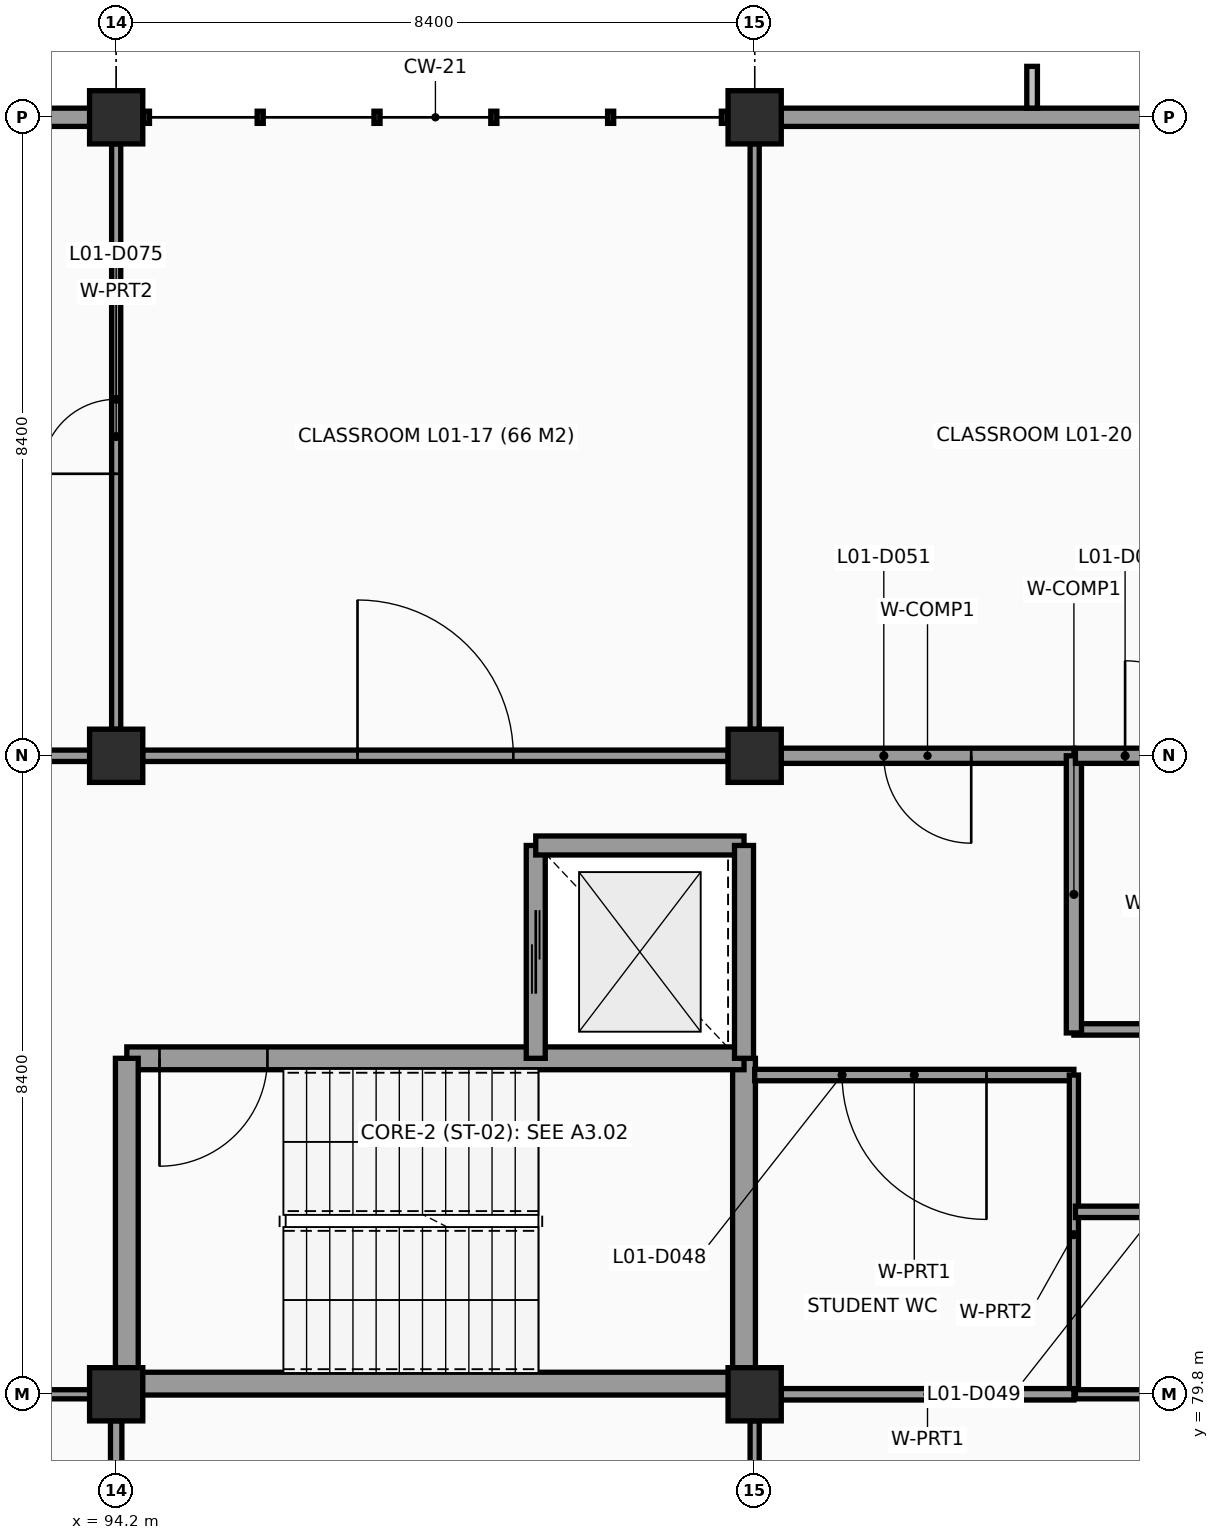
"""IFC4 building model, lengths in metres.
Left out: names, types, materials, properties, quantities, classifications, styles, units other than length and angle.
Written with IfcOpenShell. Run it as: python <this file> out.ifc"""

import sys

from ifc_helpers import new_model, si_unit, direction, frame, frame_2d, origin, origin_2d, place, context, subcontext, project, spatial, rectangle, extrude, element, fill, save


model = new_model("IFC4")
c1 = context("Model", 3, precision=1e-05, world=origin(), true_north=direction((0.0, 1.0)))
c2 = subcontext(c1, "Body", "Model", "MODEL_VIEW")
j1 = project(units=[si_unit("LENGTHUNIT", "METRE"), si_unit("PLANEANGLEUNIT", "RADIAN")], contexts=[c1])
p1 = place(None, origin())
s1 = spatial("IfcSite", under=j1, at=p1, CompositionType="ELEMENT")
p2 = place(p1, origin())
s2 = spatial("IfcBuilding", under=s1, at=p2, CompositionType="ELEMENT")
p3 = place(p2, frame((0.0, 0.0, 4.2)))
s3 = spatial("IfcBuildingStorey", under=s2, at=p3, CompositionType="ELEMENT", Elevation=4.2)
for number, where, z_axis, x_axis in (
    (1, (94.2, 79.8, 0.0), (0.0, 0.0, 1.0), (1.0, 0.0, 0.0)),
    (2, (94.2, 88.2, 0.0), (0.0, 0.0, 1.0), (1.0, 0.0, 0.0)),
    (3, (94.2, 96.6, 0.0), (0.0, 0.0, 1.0), (1.0, 0.0, 0.0)),
    (4, (102.6, 79.8, 0.0), (0.0, 0.0, 1.0), (1.0, 0.0, 0.0)),
    (5, (102.6, 88.2, 0.0), (0.0, 0.0, 1.0), (1.0, 0.0, 0.0)),
    (6, (102.6, 96.6, 0.0), (0.0, 0.0, 1.0), (1.0, 0.0, 0.0)),
):
    element("IfcColumn", number, at=place(p3, frame(where, z_axis=z_axis, x_axis=x_axis)), inside=s3, PredefinedType="COLUMN", context=c2, shape_type="SweptSolid", body=[
        extrude(rectangle(XDim=0.7, YDim=0.7, at=origin_2d()), origin(), (0.0, 0.0, 1.0), 3.6),
    ])
p4 = place(p3, frame((86.148, 96.6, 0.0), z_axis=(0.0, 0.0, 1.0), x_axis=(1.0, 0.0, 0.0)))
e7 = element("IfcWall", 7, at=p4, inside=s3, PredefinedType="SOLIDWALL", context=c2, shape_type="SweptSolid", body=[
    extrude(rectangle(XDim=7.704, YDim=0.24, at=frame_2d((3.852, 0.0))), origin(), (0.0, 0.0, 1.0), 2.57),
])
p5 = place(p3, frame((102.948, 96.6, 0.0), z_axis=(0.0, 0.0, 1.0), x_axis=(1.0, 0.0, 0.0)))
e8 = element("IfcWall", 8, at=p5, inside=s3, PredefinedType="SOLIDWALL", context=c2, shape_type="SweptSolid", body=[
    extrude(rectangle(XDim=6.604, YDim=0.24, at=frame_2d((3.302, 0.0))), origin(), (0.0, 0.0, 1.0), 2.57),
])
p6 = place(p3, frame((94.34, 79.94, 0.0), z_axis=(0.0, 0.0, 1.0), x_axis=(1.0, 0.0, 0.0)))
e9 = element("IfcWall", 9, at=p6, inside=s3, PredefinedType="SHEAR", context=c2, shape_type="SweptSolid", body=[
    extrude(rectangle(XDim=8.12, YDim=0.3, at=frame_2d((4.06, 0.0))), origin(), (0.0, 0.0, 1.0), 3.6),
])
p7 = place(p3, frame((102.46, 79.94, 0.0), z_axis=(0.0, 0.0, 1.0), x_axis=(0.0, 1.0, 0.0)))
e10 = element("IfcWall", 10, at=p7, inside=s3, PredefinedType="SHEAR", context=c2, shape_type="SweptSolid", body=[
    extrude(rectangle(XDim=4.28, YDim=0.3, at=frame_2d((2.14, 0.0))), origin(), (0.0, 0.0, 1.0), 3.6),
])
p8 = place(p3, frame((102.46, 84.22, 0.0), z_axis=(0.0, 0.0, 1.0), x_axis=(-1.0, 0.0, 0.0)))
e11 = element("IfcWall", 11, at=p8, inside=s3, PredefinedType="SHEAR", context=c2, shape_type="SweptSolid", body=[
    extrude(rectangle(XDim=8.12, YDim=0.3, at=frame_2d((4.06, 0.0))), origin(), (0.0, 0.0, 1.0), 3.6),
])
p9 = place(p8, frame((6.27, 0.0, 0.0)))
e12 = element("IfcOpeningElement", 12, at=p9, cuts=e11, PredefinedType="OPENING", context=c2, shape_type="SweptSolid", body=[
    extrude(rectangle(XDim=1.42, YDim=2.15, at=frame_2d((0.71, 1.075))), frame((0.0, 0.16, 0.0), z_axis=(0.0, -1.0, 0.0), x_axis=(1.0, 0.0, 0.0)), (0.0, 0.0, 1.0), 0.32),
])
p10 = place(p3, frame((94.34, 84.22, 0.0), z_axis=(0.0, 0.0, 1.0), x_axis=(0.0, -1.0, 0.0)))
e13 = element("IfcWall", 13, at=p10, inside=s3, PredefinedType="SHEAR", context=c2, shape_type="SweptSolid", body=[
    extrude(rectangle(XDim=4.28, YDim=0.3, at=frame_2d((2.14, 0.0))), origin(), (0.0, 0.0, 1.0), 3.6),
])
p11 = place(p3, frame((99.72, 87.02, 0.0), z_axis=(0.0, 0.0, 1.0), x_axis=(0.0, -1.0, 0.0)))
e14 = element("IfcWall", 14, at=p11, inside=s3, PredefinedType="SHEAR", context=c2, shape_type="SweptSolid", body=[
    extrude(rectangle(XDim=2.8, YDim=0.25, at=frame_2d((1.4, 0.0))), origin(), (0.0, 0.0, 1.0), 3.6),
])
p12 = place(p11, frame((0.85, 0.0, 0.0)))
e15 = element("IfcOpeningElement", 15, at=p12, cuts=e14, PredefinedType="OPENING", context=c2, shape_type="SweptSolid", body=[
    extrude(rectangle(XDim=1.1, YDim=2.15, at=frame_2d((0.55, 1.075))), frame((0.0, 0.135, 0.0), z_axis=(0.0, -1.0, 0.0), x_axis=(1.0, 0.0, 0.0)), (0.0, 0.0, 1.0), 0.27),
])
p13 = place(p3, frame((102.46, 87.02, 0.0), z_axis=(0.0, 0.0, 1.0), x_axis=(-1.0, 0.0, 0.0)))
e16 = element("IfcWall", 16, at=p13, inside=s3, PredefinedType="SHEAR", context=c2, shape_type="SweptSolid", body=[
    extrude(rectangle(XDim=2.74, YDim=0.25, at=frame_2d((1.37, 0.0))), origin(), (0.0, 0.0, 1.0), 3.6),
])
p14 = place(p3, frame((102.46, 84.22, 0.0), z_axis=(0.0, 0.0, 1.0), x_axis=(0.0, 1.0, 0.0)))
e17 = element("IfcWall", 17, at=p14, inside=s3, PredefinedType="SHEAR", context=c2, shape_type="SweptSolid", body=[
    extrude(rectangle(XDim=2.8, YDim=0.25, at=frame_2d((1.4, 0.0))), origin(), (0.0, 0.0, 1.0), 3.6),
])
p15 = place(p3, frame((102.6, 84.0, 0.0), z_axis=(0.0, 0.0, 1.0), x_axis=(1.0, 0.0, 0.0)))
e18 = element("IfcWall", 18, at=p15, inside=s3, PredefinedType="PARTITIONING", context=c2, shape_type="SweptSolid", body=[
    extrude(rectangle(XDim=4.2, YDim=0.15, at=frame_2d((2.1, 0.0))), origin(), (0.0, 0.0, 1.0), 2.67),
])
p16 = place(p15, frame((1.15, 0.0, 0.0)))
e19 = element("IfcOpeningElement", 19, at=p16, cuts=e18, PredefinedType="OPENING", context=c2, shape_type="SweptSolid", body=[
    extrude(rectangle(XDim=1.9, YDim=2.3, at=frame_2d((0.95, 1.15))), frame((0.0, 0.085, 0.0), z_axis=(0.0, -1.0, 0.0), x_axis=(1.0, 0.0, 0.0)), (0.0, 0.0, 1.0), 0.17),
])
p17 = place(p3, frame((106.8, 84.0, 0.0), z_axis=(0.0, 0.0, 1.0), x_axis=(0.0, -1.0, 0.0)))
e20 = element("IfcWall", 20, at=p17, inside=s3, PredefinedType="PARTITIONING", context=c2, shape_type="SweptSolid", body=[
    extrude(rectangle(XDim=4.2, YDim=0.12, at=frame_2d((2.1, 0.0))), origin(), (0.0, 0.0, 1.0), 2.87),
])
p18 = place(p3, frame((106.8, 79.8, 0.0), z_axis=(0.0, 0.0, 1.0), x_axis=(-1.0, 0.0, 0.0)))
e21 = element("IfcWall", 21, at=p18, inside=s3, PredefinedType="PARTITIONING", context=c2, shape_type="SweptSolid", body=[
    extrude(rectangle(XDim=3.852, YDim=0.15, at=frame_2d((1.926, 0.0))), origin(), (0.0, 0.0, 1.0), 2.87),
])
p19 = place(p3, frame((110.677, 79.8, 0.0), z_axis=(0.0, 0.0, 1.0), x_axis=(-1.0, 0.0, 0.0)))
e22 = element("IfcWall", 22, at=p19, inside=s3, PredefinedType="PARTITIONING", context=c2, shape_type="SweptSolid", body=[
    extrude(rectangle(XDim=3.857, YDim=0.12, at=frame_2d((1.928, 0.0))), origin(), (0.0, 0.0, 1.0), 2.87),
])
p20 = place(p3, frame((106.82, 82.2, 0.0), z_axis=(0.0, 0.0, 1.0), x_axis=(1.0, 0.0, 0.0)))
e23 = element("IfcWall", 23, at=p20, inside=s3, PredefinedType="PARTITIONING", context=c2, shape_type="SweptSolid", body=[
    extrude(rectangle(XDim=4.18, YDim=0.15, at=frame_2d((2.09, 0.0))), origin(), (0.0, 0.0, 1.0), 2.72),
])
p21 = place(p20, frame((1.065, 0.0, 0.0)))
e24 = element("IfcOpeningElement", 24, at=p21, cuts=e23, PredefinedType="OPENING", context=c2, shape_type="SweptSolid", body=[
    extrude(rectangle(XDim=2.05, YDim=2.35, at=frame_2d((1.025, 1.175))), frame((0.0, 0.085, 0.0), z_axis=(0.0, -1.0, 0.0), x_axis=(1.0, 0.0, 0.0)), (0.0, 0.0, 1.0), 0.17),
])
p22 = place(p3, frame((106.8, 84.6, 0.0), z_axis=(0.0, 0.0, 1.0), x_axis=(1.0, 0.0, 0.0)))
e25 = element("IfcWall", 25, at=p22, inside=s3, PredefinedType="PARTITIONING", context=c2, shape_type="SweptSolid", body=[
    extrude(rectangle(XDim=4.2, YDim=0.15, at=frame_2d((2.1, 0.0))), origin(), (0.0, 0.0, 1.0), 2.72),
])
p23 = place(p22, frame((1.65, 0.0, 0.0)))
e26 = element("IfcOpeningElement", 26, at=p23, cuts=e25, PredefinedType="OPENING", context=c2, shape_type="SweptSolid", body=[
    extrude(rectangle(XDim=0.9, YDim=2.05, at=frame_2d((0.45, 1.025))), frame((0.0, 0.085, 0.0), z_axis=(0.0, -1.0, 0.0), x_axis=(1.0, 0.0, 0.0)), (0.0, 0.0, 1.0), 0.17),
])
p24 = place(p3, frame((102.948, 88.2, 0.0), z_axis=(0.0, 0.0, 1.0), x_axis=(1.0, 0.0, 0.0)))
e27 = element("IfcWall", 27, at=p24, inside=s3, PredefinedType="PARTITIONING", context=c2, shape_type="SweptSolid", body=[
    extrude(rectangle(XDim=3.852, YDim=0.2, at=frame_2d((1.926, 0.0))), origin(), (0.0, 0.0, 1.0), 2.93),
])
p25 = place(p24, frame((1.351, 0.0, 0.0)))
e28 = element("IfcOpeningElement", 28, at=p25, cuts=e27, PredefinedType="OPENING", context=c2, shape_type="SweptSolid", body=[
    extrude(rectangle(XDim=1.15, YDim=2.15, at=frame_2d((0.575, 1.075))), frame((0.0, 0.11, 0.0), z_axis=(0.0, -1.0, 0.0), x_axis=(1.0, 0.0, 0.0)), (0.0, 0.0, 1.0), 0.22),
])
p26 = place(p3, frame((106.8, 88.2, 0.0), z_axis=(0.0, 0.0, 1.0), x_axis=(0.0, -1.0, 0.0)))
e29 = element("IfcWall", 29, at=p26, inside=s3, PredefinedType="PARTITIONING", context=c2, shape_type="SweptSolid", body=[
    extrude(rectangle(XDim=3.646, YDim=0.2, at=frame_2d((1.823, 0.0))), origin(), (0.0, 0.0, 1.0), 2.93),
])
p27 = place(p3, frame((106.82, 88.2, 0.0), z_axis=(0.0, 0.0, 1.0), x_axis=(1.0, 0.0, 0.0)))
e30 = element("IfcWall", 30, at=p27, inside=s3, PredefinedType="PARTITIONING", context=c2, shape_type="SweptSolid", body=[
    extrude(rectangle(XDim=3.857, YDim=0.2, at=frame_2d((1.928, 0.0))), origin(), (0.0, 0.0, 1.0), 2.93),
])
p28 = place(p27, frame((0.654, 0.0, 0.0)))
e31 = element("IfcOpeningElement", 31, at=p28, cuts=e30, PredefinedType="OPENING", context=c2, shape_type="SweptSolid", body=[
    extrude(rectangle(XDim=1.25, YDim=2.15, at=frame_2d((0.625, 1.075))), frame((0.0, 0.11, 0.0), z_axis=(0.0, -1.0, 0.0), x_axis=(1.0, 0.0, 0.0)), (0.0, 0.0, 1.0), 0.22),
])
p29 = place(p3, frame((86.148, 79.8, 0.0), z_axis=(0.0, 0.0, 1.0), x_axis=(1.0, 0.0, 0.0)))
e32 = element("IfcWall", 32, at=p29, inside=s3, PredefinedType="PARTITIONING", context=c2, shape_type="SweptSolid", body=[
    extrude(rectangle(XDim=7.704, YDim=0.12, at=frame_2d((3.852, 0.0))), origin(), (0.0, 0.0, 1.0), 2.87),
])
p30 = place(p3, frame((94.2, 79.452, 0.0), z_axis=(0.0, 0.0, 1.0), x_axis=(0.0, -1.0, 0.0)))
e33 = element("IfcWall", 33, at=p30, inside=s3, PredefinedType="PARTITIONING", context=c2, shape_type="SweptSolid", body=[
    extrude(rectangle(XDim=5.652, YDim=0.15, at=frame_2d((2.826, 0.0))), origin(), (0.0, 0.0, 1.0), 2.96),
])
p31 = place(p3, frame((86.148, 88.2, 0.0), z_axis=(0.0, 0.0, 1.0), x_axis=(1.0, 0.0, 0.0)))
e34 = element("IfcWall", 34, at=p31, inside=s3, PredefinedType="PARTITIONING", context=c2, shape_type="SweptSolid", body=[
    extrude(rectangle(XDim=7.704, YDim=0.15, at=frame_2d((3.852, 0.0))), origin(), (0.0, 0.0, 1.0), 2.93),
])
p32 = place(p31, frame((3.252, 0.0, 0.0)))
e35 = element("IfcOpeningElement", 35, at=p32, cuts=e34, PredefinedType="OPENING", context=c2, shape_type="SweptSolid", body=[
    extrude(rectangle(XDim=1.2, YDim=2.15, at=frame_2d((0.6, 1.075))), frame((0.0, 0.085, 0.0), z_axis=(0.0, -1.0, 0.0), x_axis=(1.0, 0.0, 0.0)), (0.0, 0.0, 1.0), 0.17),
])
p33 = place(p3, frame((94.2, 96.252, 0.0), z_axis=(0.0, 0.0, 1.0), x_axis=(0.0, -1.0, 0.0)))
e36 = element("IfcWall", 36, at=p33, inside=s3, PredefinedType="PARTITIONING", context=c2, shape_type="SweptSolid", body=[
    extrude(rectangle(XDim=7.704, YDim=0.12, at=frame_2d((3.852, 0.0))), origin(), (0.0, 0.0, 1.0), 2.96),
])
p34 = place(p33, frame((3.362, 0.0, 0.0)))
e37 = element("IfcOpeningElement", 37, at=p34, cuts=e36, PredefinedType="OPENING", context=c2, shape_type="SweptSolid", body=[
    extrude(rectangle(XDim=0.98, YDim=2.12, at=frame_2d((0.49, 1.06))), frame((0.0, 0.07, 0.0), z_axis=(0.0, -1.0, 0.0), x_axis=(1.0, 0.0, 0.0)), (0.0, 0.0, 1.0), 0.14),
])
p35 = place(p3, frame((102.6, 79.452, 0.0), z_axis=(0.0, 0.0, 1.0), x_axis=(0.0, -1.0, 0.0)))
e38 = element("IfcWall", 38, at=p35, inside=s3, PredefinedType="PARTITIONING", context=c2, shape_type="SweptSolid", body=[
    extrude(rectangle(XDim=5.652, YDim=0.12, at=frame_2d((2.826, 0.0))), origin(), (0.0, 0.0, 1.0), 2.67),
])
p36 = place(p35, frame((2.326, 0.0, 0.0)))
e39 = element("IfcOpeningElement", 39, at=p36, cuts=e38, PredefinedType="OPENING", context=c2, shape_type="SweptSolid", body=[
    extrude(rectangle(XDim=1.0, YDim=2.1, at=frame_2d((0.5, 1.05))), frame((0.0, 0.07, 0.0), z_axis=(0.0, -1.0, 0.0), x_axis=(1.0, 0.0, 0.0)), (0.0, 0.0, 1.0), 0.14),
])
p37 = place(p3, frame((102.252, 88.2, 0.0), z_axis=(0.0, 0.0, 1.0), x_axis=(-1.0, 0.0, 0.0)))
e40 = element("IfcWall", 40, at=p37, inside=s3, PredefinedType="PARTITIONING", context=c2, shape_type="SweptSolid", body=[
    extrude(rectangle(XDim=7.704, YDim=0.15, at=frame_2d((3.852, 0.0))), origin(), (0.0, 0.0, 1.0), 2.93),
])
p38 = place(p37, frame((2.827, 0.0, 0.0)))
e41 = element("IfcOpeningElement", 41, at=p38, cuts=e40, PredefinedType="OPENING", context=c2, shape_type="SweptSolid", body=[
    extrude(rectangle(XDim=2.05, YDim=2.35, at=frame_2d((1.025, 1.175))), frame((0.0, 0.085, 0.0), z_axis=(0.0, -1.0, 0.0), x_axis=(1.0, 0.0, 0.0)), (0.0, 0.0, 1.0), 0.17),
])
p39 = place(p3, frame((102.6, 96.252, 0.0), z_axis=(0.0, 0.0, 1.0), x_axis=(0.0, -1.0, 0.0)))
e42 = element("IfcWall", 42, at=p39, inside=s3, PredefinedType="PARTITIONING", context=c2, shape_type="SweptSolid", body=[
    extrude(rectangle(XDim=7.704, YDim=0.12, at=frame_2d((3.852, 0.0))), origin(), (0.0, 0.0, 1.0), 2.67),
])
p40 = place(p9, frame((1.42, 0.0, 0.0), z_axis=(0.0, 0.0, 1.0), x_axis=(-1.0, 0.0, 0.0)))
e43 = element("IfcDoor", 43, at=p40, inside=s3, OperationType="SINGLE_SWING_RIGHT", PredefinedType="DOOR", context=c2, shape_type="SweptSolid", body=[
    extrude(rectangle(XDim=1.42, YDim=2.15, at=frame_2d((0.71, 1.075))), frame((0.0, 0.025, 0.0), z_axis=(0.0, -1.0, 0.0), x_axis=(1.0, 0.0, 0.0)), (0.0, 0.0, 1.0), 0.05),
])
fill(e12, e43)
p41 = place(p12, origin())
e44 = element("IfcDoor", 44, at=p41, inside=s3, OperationType="DOUBLE_DOOR_SLIDING", PredefinedType="DOOR", context=c2, shape_type="SweptSolid", body=[
    extrude(rectangle(XDim=1.1, YDim=2.15, at=frame_2d((0.55, 1.075))), frame((0.0, 0.025, 0.0), z_axis=(0.0, -1.0, 0.0), x_axis=(1.0, 0.0, 0.0)), (0.0, 0.0, 1.0), 0.05),
])
fill(e15, e44)
p42 = place(p16, origin())
e45 = element("IfcDoor", 45, at=p42, inside=s3, OperationType="DOUBLE_DOOR_SINGLE_SWING", PredefinedType="DOOR", context=c2, shape_type="SweptSolid", body=[
    extrude(rectangle(XDim=1.9, YDim=2.3, at=frame_2d((0.95, 1.15))), frame((0.0, 0.025, 0.0), z_axis=(0.0, -1.0, 0.0), x_axis=(1.0, 0.0, 0.0)), (0.0, 0.0, 1.0), 0.05),
])
fill(e19, e45)
p43 = place(p25, origin())
e46 = element("IfcDoor", 46, at=p43, inside=s3, OperationType="SINGLE_SWING_RIGHT", PredefinedType="DOOR", context=c2, shape_type="SweptSolid", body=[
    extrude(rectangle(XDim=1.15, YDim=2.15, at=frame_2d((0.575, 1.075))), frame((0.0, 0.025, 0.0), z_axis=(0.0, -1.0, 0.0), x_axis=(1.0, 0.0, 0.0)), (0.0, 0.0, 1.0), 0.05),
])
fill(e28, e46)
p44 = place(p28, origin())
e47 = element("IfcDoor", 47, at=p44, inside=s3, OperationType="SINGLE_SWING_LEFT", PredefinedType="DOOR", context=c2, shape_type="SweptSolid", body=[
    extrude(rectangle(XDim=1.25, YDim=2.15, at=frame_2d((0.625, 1.075))), frame((0.0, 0.025, 0.0), z_axis=(0.0, -1.0, 0.0), x_axis=(1.0, 0.0, 0.0)), (0.0, 0.0, 1.0), 0.05),
])
fill(e31, e47)
p45 = place(p34, origin())
e48 = element("IfcDoor", 48, at=p45, inside=s3, OperationType="SINGLE_SWING_RIGHT", PredefinedType="DOOR", context=c2, shape_type="SweptSolid", body=[
    extrude(rectangle(XDim=0.98, YDim=2.12, at=frame_2d((0.49, 1.06))), frame((0.0, 0.025, 0.0), z_axis=(0.0, -1.0, 0.0), x_axis=(1.0, 0.0, 0.0)), (0.0, 0.0, 1.0), 0.05),
])
fill(e37, e48)
p46 = place(p38, origin())
e49 = element("IfcDoor", 49, at=p46, inside=s3, OperationType="DOUBLE_DOOR_SINGLE_SWING", PredefinedType="DOOR", context=c2, shape_type="SweptSolid", body=[
    extrude(rectangle(XDim=2.05, YDim=2.35, at=frame_2d((1.025, 1.175))), frame((0.0, 0.025, 0.0), z_axis=(0.0, -1.0, 0.0), x_axis=(1.0, 0.0, 0.0)), (0.0, 0.0, 1.0), 0.05),
])
fill(e41, e49)
save(model, sys.argv[1])
